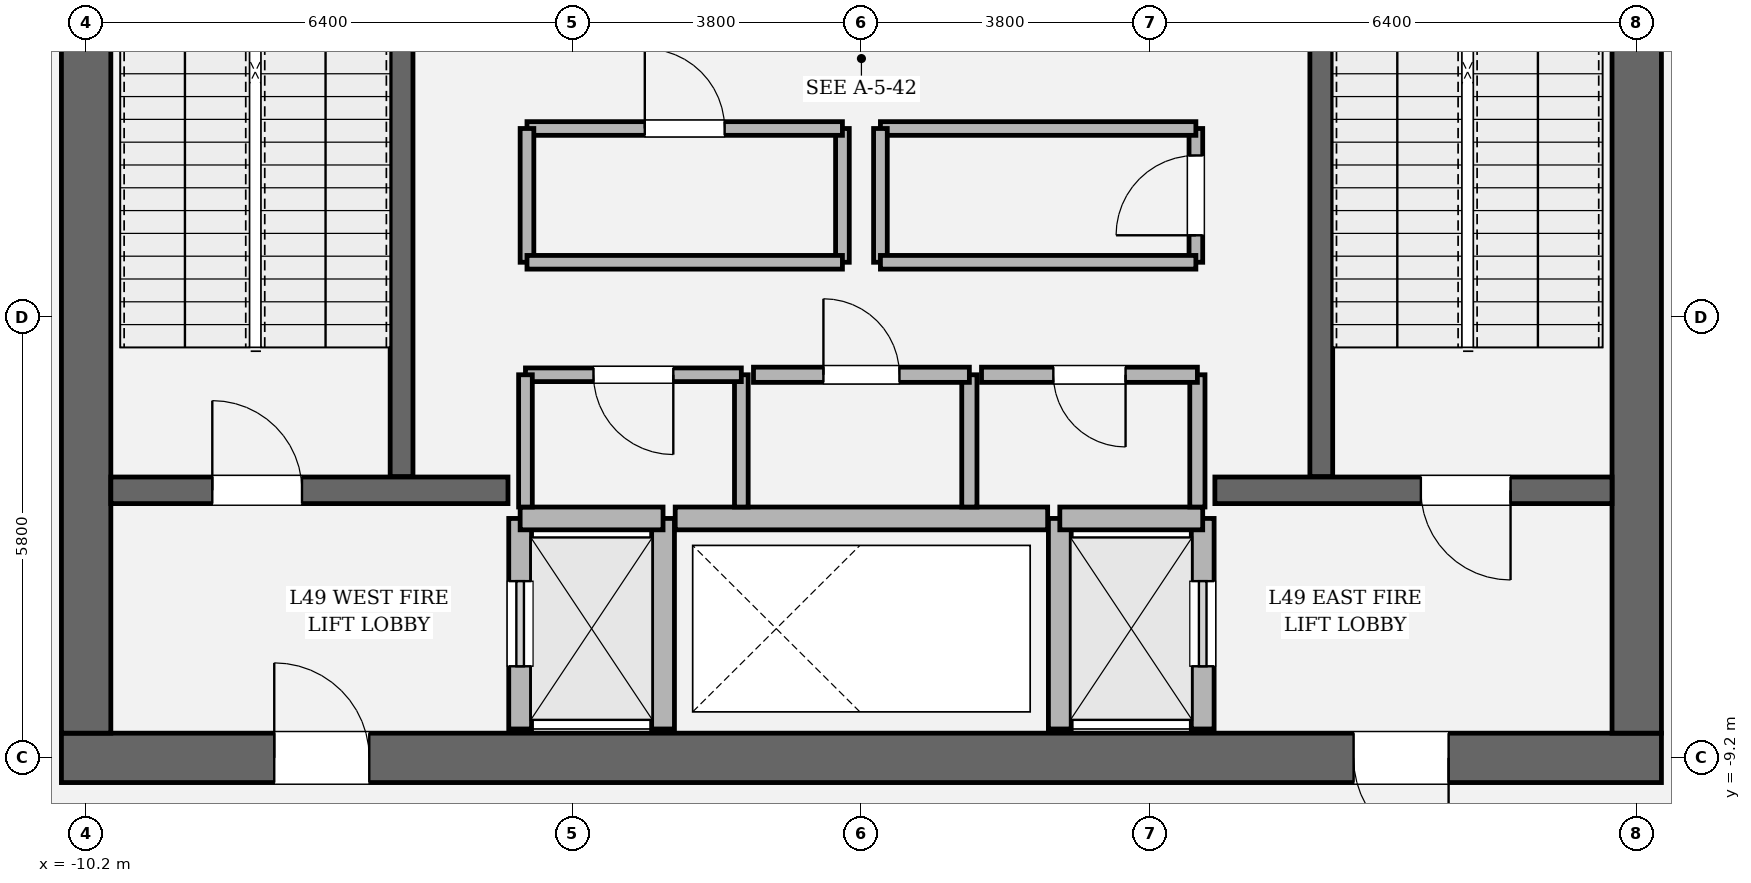
"""IFC4 building model, lengths in metres.
Left out: names, types, materials, properties, quantities, classifications, styles, units other than length and angle.
Written with IfcOpenShell. Run it as: python <this file> out.ifc"""

import sys

from ifc_helpers import new_model, si_unit, direction, frame, frame_2d, origin, place, context, subcontext, project, spatial, rectangle, extrude, element, fill, save


model = new_model("IFC4")
c1 = context("Model", 3, precision=1e-05, world=origin(), true_north=direction((0.0, 1.0)))
c2 = subcontext(c1, "Body", "Model", "MODEL_VIEW")
j1 = project(units=[si_unit("LENGTHUNIT", "METRE"), si_unit("PLANEANGLEUNIT", "RADIAN")], contexts=[c1])
p1 = place(None, origin())
s1 = spatial("IfcSite", under=j1, at=p1, CompositionType="ELEMENT")
p2 = place(p1, origin())
s2 = spatial("IfcBuilding", under=s1, at=p2, CompositionType="ELEMENT")
p3 = place(p2, frame((0.0, 0.0, 208.65)))
s3 = spatial("IfcBuildingStorey", under=s2, at=p3, CompositionType="ELEMENT", Elevation=208.65)
p4 = place(p3, frame((10.525, -9.2, 0.0), z_axis=(0.0, 0.0, 1.0), x_axis=(-1.0, 0.0, 0.0)))
e1 = element("IfcWall", 1, at=p4, inside=s3, PredefinedType="SHEAR", context=c2, shape_type="SweptSolid", body=[
    extrude(rectangle(XDim=21.05, YDim=0.65, at=frame_2d((10.525, 0.0))), origin(), (0.0, 0.0, 1.0), 4.05),
])
p5 = place(p4, frame((2.8, 0.0, 0.0)))
e2 = element("IfcOpeningElement", 2, at=p5, cuts=e1, PredefinedType="OPENING", context=c2, shape_type="SweptSolid", body=[
    extrude(rectangle(XDim=1.25, YDim=2.25, at=frame_2d((0.625, 1.125))), frame((0.0, 0.335, 0.0), z_axis=(0.0, -1.0, 0.0), x_axis=(1.0, 0.0, 0.0)), (0.0, 0.0, 1.0), 0.67),
])
p6 = place(p4, frame((17.0, 0.0, 0.0)))
e3 = element("IfcOpeningElement", 3, at=p6, cuts=e1, PredefinedType="OPENING", context=c2, shape_type="SweptSolid", body=[
    extrude(rectangle(XDim=1.25, YDim=2.25, at=frame_2d((0.625, 1.125))), frame((0.0, 0.335, 0.0), z_axis=(0.0, -1.0, 0.0), x_axis=(1.0, 0.0, 0.0)), (0.0, 0.0, 1.0), 0.67),
])
p7 = place(p3, frame((-10.2, -8.875, 0.0), z_axis=(0.0, 0.0, 1.0), x_axis=(0.0, 1.0, 0.0)))
e4 = element("IfcWall", 4, at=p7, inside=s3, PredefinedType="SHEAR", context=c2, shape_type="SweptSolid", body=[
    extrude(rectangle(XDim=17.75, YDim=0.65, at=frame_2d((8.875, 0.0))), origin(), (0.0, 0.0, 1.0), 4.05),
])
p8 = place(p7, frame((12.665, 0.0, 0.0)))
e5 = element("IfcOpeningElement", 5, at=p8, cuts=e4, PredefinedType="OPENING", context=c2, shape_type="SweptSolid", body=[
    extrude(rectangle(XDim=1.18, YDim=2.2, at=frame_2d((0.59, 1.1))), frame((0.0, 0.335, 0.0), z_axis=(0.0, -1.0, 0.0), x_axis=(1.0, 0.0, 0.0)), (0.0, 0.0, 1.0), 0.67),
])
p9 = place(p3, frame((10.2, 8.875, 0.0), z_axis=(0.0, 0.0, 1.0), x_axis=(0.0, -1.0, 0.0)))
e6 = element("IfcWall", 6, at=p9, inside=s3, PredefinedType="SHEAR", context=c2, shape_type="SweptSolid", body=[
    extrude(rectangle(XDim=17.75, YDim=0.65, at=frame_2d((8.875, 0.0))), origin(), (0.0, 0.0, 1.0), 4.05),
])
p10 = place(p9, frame((3.905, 0.0, 0.0)))
e7 = element("IfcOpeningElement", 7, at=p10, cuts=e6, PredefinedType="OPENING", context=c2, shape_type="SweptSolid", body=[
    extrude(rectangle(XDim=1.18, YDim=2.2, at=frame_2d((0.59, 1.1))), frame((0.0, 0.335, 0.0), z_axis=(0.0, -1.0, 0.0), x_axis=(1.0, 0.0, 0.0)), (0.0, 0.0, 1.0), 0.67),
])
for number, where, z_axis, x_axis in (
    (8, (-6.05, -5.5, 0.0), (0.0, 0.0, 1.0), (0.0, 1.0, 0.0)),
    (9, (6.05, 3.45, 0.0), (0.0, 0.0, 1.0), (0.0, -1.0, 0.0)),
):
    element("IfcWall", number, at=place(p3, frame(where, z_axis=z_axis, x_axis=x_axis)), inside=s3, PredefinedType="SOLIDWALL", context=c2, shape_type="SweptSolid", body=[
        extrude(rectangle(XDim=8.95, YDim=0.3, at=frame_2d((4.475, 0.0))), origin(), (0.0, 0.0, 1.0), 4.05),
    ])
p11 = place(p3, frame((-9.875, -5.68, 0.0), z_axis=(0.0, 0.0, 1.0), x_axis=(1.0, 0.0, 0.0)))
e10 = element("IfcWall", 10, at=p11, inside=s3, PredefinedType="SOLIDWALL", context=c2, shape_type="SweptSolid", body=[
    extrude(rectangle(XDim=5.225, YDim=0.35, at=frame_2d((2.613, 0.0))), origin(), (0.0, 0.0, 1.0), 4.05),
])
p12 = place(p11, frame((1.335, 0.0, 0.0)))
e11 = element("IfcOpeningElement", 11, at=p12, cuts=e10, PredefinedType="OPENING", context=c2, shape_type="SweptSolid", body=[
    extrude(rectangle(XDim=1.18, YDim=2.2, at=frame_2d((0.59, 1.1))), frame((0.0, 0.185, 0.0), z_axis=(0.0, -1.0, 0.0), x_axis=(1.0, 0.0, 0.0)), (0.0, 0.0, 1.0), 0.37),
])
p13 = place(p3, frame((4.65, -5.68, 0.0), z_axis=(0.0, 0.0, 1.0), x_axis=(1.0, 0.0, 0.0)))
e12 = element("IfcWall", 12, at=p13, inside=s3, PredefinedType="SOLIDWALL", context=c2, shape_type="SweptSolid", body=[
    extrude(rectangle(XDim=5.225, YDim=0.35, at=frame_2d((2.613, 0.0))), origin(), (0.0, 0.0, 1.0), 4.05),
])
p14 = place(p13, frame((2.71, 0.0, 0.0)))
e13 = element("IfcOpeningElement", 13, at=p14, cuts=e12, PredefinedType="OPENING", context=c2, shape_type="SweptSolid", body=[
    extrude(rectangle(XDim=1.18, YDim=2.2, at=frame_2d((0.59, 1.1))), frame((0.0, 0.185, 0.0), z_axis=(0.0, -1.0, 0.0), x_axis=(1.0, 0.0, 0.0)), (0.0, 0.0, 1.0), 0.37),
])
p15 = place(p3, frame((-4.49, -8.82, 0.0), z_axis=(0.0, 0.0, 1.0), x_axis=(0.0, 1.0, 0.0)))
e14 = element("IfcWall", 14, at=p15, inside=s3, PredefinedType="SOLIDWALL", context=c2, shape_type="SweptSolid", body=[
    extrude(rectangle(XDim=2.77, YDim=0.3, at=frame_2d((1.385, 0.0))), origin(), (0.0, 0.0, 1.0), 3.83),
])
p16 = place(p15, frame((0.825, 0.0, 0.0)))
e15 = element("IfcOpeningElement", 15, at=p16, cuts=e14, PredefinedType="OPENING", context=c2, shape_type="SweptSolid", body=[
    extrude(rectangle(XDim=1.12, YDim=2.25, at=frame_2d((0.56, 1.125))), frame((0.0, 0.16, 0.0), z_axis=(0.0, -1.0, 0.0), x_axis=(1.0, 0.0, 0.0)), (0.0, 0.0, 1.0), 0.32),
])
p17 = place(p3, frame((-2.61, -8.82, 0.0), z_axis=(0.0, 0.0, 1.0), x_axis=(0.0, 1.0, 0.0)))
e16 = element("IfcWall", 16, at=p17, inside=s3, PredefinedType="SOLIDWALL", context=c2, shape_type="SweptSolid", body=[
    extrude(rectangle(XDim=2.77, YDim=0.3, at=frame_2d((1.385, 0.0))), origin(), (0.0, 0.0, 1.0), 3.83),
])
p18 = place(p3, frame((-4.49, -6.05, 0.0), z_axis=(0.0, 0.0, 1.0), x_axis=(1.0, 0.0, 0.0)))
e17 = element("IfcWall", 17, at=p18, inside=s3, PredefinedType="SOLIDWALL", context=c2, shape_type="SweptSolid", body=[
    extrude(rectangle(XDim=1.88, YDim=0.3, at=frame_2d((0.94, 0.0))), origin(), (0.0, 0.0, 1.0), 3.83),
])
p19 = place(p3, frame((4.49, -8.82, 0.0), z_axis=(0.0, 0.0, 1.0), x_axis=(0.0, 1.0, 0.0)))
e18 = element("IfcWall", 18, at=p19, inside=s3, PredefinedType="SOLIDWALL", context=c2, shape_type="SweptSolid", body=[
    extrude(rectangle(XDim=2.77, YDim=0.3, at=frame_2d((1.385, 0.0))), origin(), (0.0, 0.0, 1.0), 3.83),
])
p20 = place(p19, frame((0.825, 0.0, 0.0)))
e19 = element("IfcOpeningElement", 19, at=p20, cuts=e18, PredefinedType="OPENING", context=c2, shape_type="SweptSolid", body=[
    extrude(rectangle(XDim=1.12, YDim=2.25, at=frame_2d((0.56, 1.125))), frame((0.0, 0.16, 0.0), z_axis=(0.0, -1.0, 0.0), x_axis=(1.0, 0.0, 0.0)), (0.0, 0.0, 1.0), 0.32),
])
p21 = place(p3, frame((2.61, -8.82, 0.0), z_axis=(0.0, 0.0, 1.0), x_axis=(0.0, 1.0, 0.0)))
e20 = element("IfcWall", 20, at=p21, inside=s3, PredefinedType="SOLIDWALL", context=c2, shape_type="SweptSolid", body=[
    extrude(rectangle(XDim=2.77, YDim=0.3, at=frame_2d((1.385, 0.0))), origin(), (0.0, 0.0, 1.0), 3.83),
])
p22 = place(p3, frame((2.61, -6.05, 0.0), z_axis=(0.0, 0.0, 1.0), x_axis=(1.0, 0.0, 0.0)))
e21 = element("IfcWall", 21, at=p22, inside=s3, PredefinedType="SOLIDWALL", context=c2, shape_type="SweptSolid", body=[
    extrude(rectangle(XDim=1.88, YDim=0.3, at=frame_2d((0.94, 0.0))), origin(), (0.0, 0.0, 1.0), 3.83),
])
p23 = place(p3, frame((-2.45, -6.05, 0.0), z_axis=(0.0, 0.0, 1.0), x_axis=(1.0, 0.0, 0.0)))
e22 = element("IfcWall", 22, at=p23, inside=s3, PredefinedType="SOLIDWALL", context=c2, shape_type="SweptSolid", body=[
    extrude(rectangle(XDim=4.9, YDim=0.3, at=frame_2d((2.45, 0.0))), origin(), (0.0, 0.0, 1.0), 3.83),
])
p24 = place(p3, frame((-1.58, -5.9, 0.0), z_axis=(0.0, 0.0, 1.0), x_axis=(0.0, 1.0, 0.0)))
e23 = element("IfcWall", 23, at=p24, inside=s3, PredefinedType="PARTITIONING", context=c2, shape_type="SweptSolid", body=[
    extrude(rectangle(XDim=1.74, YDim=0.18, at=frame_2d((0.87, 0.0))), origin(), (0.0, 0.0, 1.0), 3.83),
])
p25 = place(p3, frame((-1.58, -4.16, 0.0), z_axis=(0.0, 0.0, 1.0), x_axis=(-1.0, 0.0, 0.0)))
e24 = element("IfcWall", 24, at=p25, inside=s3, PredefinedType="PARTITIONING", context=c2, shape_type="SweptSolid", body=[
    extrude(rectangle(XDim=2.84, YDim=0.18, at=frame_2d((1.42, 0.0))), origin(), (0.0, 0.0, 1.0), 3.83),
])
p26 = place(p25, frame((0.895, 0.0, 0.0)))
e25 = element("IfcOpeningElement", 25, at=p26, cuts=e24, PredefinedType="OPENING", context=c2, shape_type="SweptSolid", body=[
    extrude(rectangle(XDim=1.05, YDim=2.2, at=frame_2d((0.525, 1.1))), frame((0.0, 0.1, 0.0), z_axis=(0.0, -1.0, 0.0), x_axis=(1.0, 0.0, 0.0)), (0.0, 0.0, 1.0), 0.2),
])
p27 = place(p3, frame((-4.42, -4.16, 0.0), z_axis=(0.0, 0.0, 1.0), x_axis=(0.0, -1.0, 0.0)))
e26 = element("IfcWall", 26, at=p27, inside=s3, PredefinedType="PARTITIONING", context=c2, shape_type="SweptSolid", body=[
    extrude(rectangle(XDim=1.74, YDim=0.18, at=frame_2d((0.87, 0.0))), origin(), (0.0, 0.0, 1.0), 3.83),
])
p28 = place(p3, frame((1.42, -5.9, 0.0), z_axis=(0.0, 0.0, 1.0), x_axis=(0.0, 1.0, 0.0)))
e27 = element("IfcWall", 27, at=p28, inside=s3, PredefinedType="SOLIDWALL", context=c2, shape_type="SweptSolid", body=[
    extrude(rectangle(XDim=1.74, YDim=0.2, at=frame_2d((0.87, 0.0))), origin(), (0.0, 0.0, 1.0), 3.83),
])
p29 = place(p3, frame((1.42, -4.16, 0.0), z_axis=(0.0, 0.0, 1.0), x_axis=(-1.0, 0.0, 0.0)))
e28 = element("IfcWall", 28, at=p29, inside=s3, PredefinedType="SOLIDWALL", context=c2, shape_type="SweptSolid", body=[
    extrude(rectangle(XDim=2.84, YDim=0.2, at=frame_2d((1.42, 0.0))), origin(), (0.0, 0.0, 1.0), 3.83),
])
p30 = place(p29, frame((0.92, 0.0, 0.0)))
e29 = element("IfcOpeningElement", 29, at=p30, cuts=e28, PredefinedType="OPENING", context=c2, shape_type="SweptSolid", body=[
    extrude(rectangle(XDim=1.0, YDim=2.15, at=frame_2d((0.5, 1.075))), frame((0.0, 0.11, 0.0), z_axis=(0.0, -1.0, 0.0), x_axis=(1.0, 0.0, 0.0)), (0.0, 0.0, 1.0), 0.22),
])
p31 = place(p3, frame((4.42, -5.9, 0.0), z_axis=(0.0, 0.0, 1.0), x_axis=(0.0, 1.0, 0.0)))
e30 = element("IfcWall", 30, at=p31, inside=s3, PredefinedType="SOLIDWALL", context=c2, shape_type="SweptSolid", body=[
    extrude(rectangle(XDim=1.74, YDim=0.2, at=frame_2d((0.87, 0.0))), origin(), (0.0, 0.0, 1.0), 3.83),
])
p32 = place(p3, frame((4.42, -4.16, 0.0), z_axis=(0.0, 0.0, 1.0), x_axis=(-1.0, 0.0, 0.0)))
e31 = element("IfcWall", 31, at=p32, inside=s3, PredefinedType="SOLIDWALL", context=c2, shape_type="SweptSolid", body=[
    extrude(rectangle(XDim=2.84, YDim=0.2, at=frame_2d((1.42, 0.0))), origin(), (0.0, 0.0, 1.0), 3.83),
])
p33 = place(p32, frame((0.945, 0.0, 0.0)))
e32 = element("IfcOpeningElement", 32, at=p33, cuts=e31, PredefinedType="OPENING", context=c2, shape_type="SweptSolid", body=[
    extrude(rectangle(XDim=0.95, YDim=2.15, at=frame_2d((0.475, 1.075))), frame((0.0, 0.11, 0.0), z_axis=(0.0, -1.0, 0.0), x_axis=(1.0, 0.0, 0.0)), (0.0, 0.0, 1.0), 0.22),
])
p34 = place(p3, frame((-0.25, -2.68, 0.0), z_axis=(0.0, 0.0, 1.0), x_axis=(0.0, 1.0, 0.0)))
e33 = element("IfcWall", 33, at=p34, inside=s3, PredefinedType="PARTITIONING", context=c2, shape_type="SweptSolid", body=[
    extrude(rectangle(XDim=1.76, YDim=0.18, at=frame_2d((0.88, 0.0))), origin(), (0.0, 0.0, 1.0), 3.83),
])
p35 = place(p3, frame((-0.25, -0.92, 0.0), z_axis=(0.0, 0.0, 1.0), x_axis=(-1.0, 0.0, 0.0)))
e34 = element("IfcWall", 34, at=p35, inside=s3, PredefinedType="PARTITIONING", context=c2, shape_type="SweptSolid", body=[
    extrude(rectangle(XDim=4.15, YDim=0.18, at=frame_2d((2.075, 0.0))), origin(), (0.0, 0.0, 1.0), 3.83),
])
p36 = place(p35, frame((1.55, 0.0, 0.0)))
e35 = element("IfcOpeningElement", 35, at=p36, cuts=e34, PredefinedType="OPENING", context=c2, shape_type="SweptSolid", body=[
    extrude(rectangle(XDim=1.05, YDim=2.2, at=frame_2d((0.525, 1.1))), frame((0.0, 0.1, 0.0), z_axis=(0.0, -1.0, 0.0), x_axis=(1.0, 0.0, 0.0)), (0.0, 0.0, 1.0), 0.2),
])
p37 = place(p3, frame((-4.4, -0.92, 0.0), z_axis=(0.0, 0.0, 1.0), x_axis=(0.0, -1.0, 0.0)))
e36 = element("IfcWall", 36, at=p37, inside=s3, PredefinedType="PARTITIONING", context=c2, shape_type="SweptSolid", body=[
    extrude(rectangle(XDim=1.76, YDim=0.18, at=frame_2d((0.88, 0.0))), origin(), (0.0, 0.0, 1.0), 3.83),
])
p38 = place(p3, frame((-4.4, -2.68, 0.0), z_axis=(0.0, 0.0, 1.0), x_axis=(1.0, 0.0, 0.0)))
e37 = element("IfcWall", 37, at=p38, inside=s3, PredefinedType="PARTITIONING", context=c2, shape_type="SweptSolid", body=[
    extrude(rectangle(XDim=4.15, YDim=0.18, at=frame_2d((2.075, 0.0))), origin(), (0.0, 0.0, 1.0), 3.83),
])
p39 = place(p3, frame((4.4, -2.68, 0.0), z_axis=(0.0, 0.0, 1.0), x_axis=(0.0, 1.0, 0.0)))
e38 = element("IfcWall", 38, at=p39, inside=s3, PredefinedType="PARTITIONING", context=c2, shape_type="SweptSolid", body=[
    extrude(rectangle(XDim=1.76, YDim=0.18, at=frame_2d((0.88, 0.0))), origin(), (0.0, 0.0, 1.0), 3.83),
])
p40 = place(p39, frame((0.355, 0.0, 0.0)))
e39 = element("IfcOpeningElement", 39, at=p40, cuts=e38, PredefinedType="OPENING", context=c2, shape_type="SweptSolid", body=[
    extrude(rectangle(XDim=1.05, YDim=2.2, at=frame_2d((0.525, 1.1))), frame((0.0, 0.1, 0.0), z_axis=(0.0, -1.0, 0.0), x_axis=(1.0, 0.0, 0.0)), (0.0, 0.0, 1.0), 0.2),
])
p41 = place(p3, frame((4.4, -0.92, 0.0), z_axis=(0.0, 0.0, 1.0), x_axis=(-1.0, 0.0, 0.0)))
e40 = element("IfcWall", 40, at=p41, inside=s3, PredefinedType="PARTITIONING", context=c2, shape_type="SweptSolid", body=[
    extrude(rectangle(XDim=4.15, YDim=0.18, at=frame_2d((2.075, 0.0))), origin(), (0.0, 0.0, 1.0), 3.83),
])
p42 = place(p3, frame((0.25, -0.92, 0.0), z_axis=(0.0, 0.0, 1.0), x_axis=(0.0, -1.0, 0.0)))
e41 = element("IfcWall", 41, at=p42, inside=s3, PredefinedType="PARTITIONING", context=c2, shape_type="SweptSolid", body=[
    extrude(rectangle(XDim=1.76, YDim=0.18, at=frame_2d((0.88, 0.0))), origin(), (0.0, 0.0, 1.0), 3.83),
])
p43 = place(p3, frame((0.25, -2.68, 0.0), z_axis=(0.0, 0.0, 1.0), x_axis=(1.0, 0.0, 0.0)))
e42 = element("IfcWall", 42, at=p43, inside=s3, PredefinedType="PARTITIONING", context=c2, shape_type="SweptSolid", body=[
    extrude(rectangle(XDim=4.15, YDim=0.18, at=frame_2d((2.075, 0.0))), origin(), (0.0, 0.0, 1.0), 3.83),
])
p44 = place(p12, origin())
e43 = element("IfcDoor", 43, at=p44, inside=s3, OperationType="SINGLE_SWING_LEFT", PredefinedType="DOOR", context=c2, shape_type="SweptSolid", body=[
    extrude(rectangle(XDim=1.18, YDim=2.2, at=frame_2d((0.59, 1.1))), frame((0.0, 0.025, 0.0), z_axis=(0.0, -1.0, 0.0), x_axis=(1.0, 0.0, 0.0)), (0.0, 0.0, 1.0), 0.05),
])
fill(e11, e43)
p45 = place(p14, origin())
e44 = element("IfcDoor", 44, at=p45, inside=s3, OperationType="SINGLE_SWING_RIGHT", PredefinedType="DOOR", context=c2, shape_type="SweptSolid", body=[
    extrude(rectangle(XDim=1.18, YDim=2.2, at=frame_2d((0.59, 1.1))), frame((0.0, 0.025, 0.0), z_axis=(0.0, -1.0, 0.0), x_axis=(1.0, 0.0, 0.0)), (0.0, 0.0, 1.0), 0.05),
])
fill(e13, e44)
p46 = place(p5, origin())
e45 = element("IfcDoor", 45, at=p46, inside=s3, OperationType="SINGLE_SWING_LEFT", PredefinedType="DOOR", context=c2, shape_type="SweptSolid", body=[
    extrude(rectangle(XDim=1.25, YDim=2.25, at=frame_2d((0.625, 1.125))), frame((0.0, 0.025, 0.0), z_axis=(0.0, -1.0, 0.0), x_axis=(1.0, 0.0, 0.0)), (0.0, 0.0, 1.0), 0.05),
])
fill(e2, e45)
p47 = place(p6, origin())
e46 = element("IfcDoor", 46, at=p47, inside=s3, OperationType="SINGLE_SWING_RIGHT", PredefinedType="DOOR", context=c2, shape_type="SweptSolid", body=[
    extrude(rectangle(XDim=1.25, YDim=2.25, at=frame_2d((0.625, 1.125))), frame((0.0, 0.025, 0.0), z_axis=(0.0, -1.0, 0.0), x_axis=(1.0, 0.0, 0.0)), (0.0, 0.0, 1.0), 0.05),
])
fill(e3, e46)
p48 = place(p16, origin())
e47 = element("IfcDoor", 47, at=p48, inside=s3, OperationType="SLIDING_TO_LEFT", PredefinedType="DOOR", context=c2, shape_type="SweptSolid", body=[
    extrude(rectangle(XDim=1.12, YDim=2.25, at=frame_2d((0.56, 1.125))), frame((0.0, 0.025, 0.0), z_axis=(0.0, -1.0, 0.0), x_axis=(1.0, 0.0, 0.0)), (0.0, 0.0, 1.0), 0.05),
])
fill(e15, e47)
p49 = place(p20, origin())
e48 = element("IfcDoor", 48, at=p49, inside=s3, OperationType="SLIDING_TO_RIGHT", PredefinedType="DOOR", context=c2, shape_type="SweptSolid", body=[
    extrude(rectangle(XDim=1.12, YDim=2.25, at=frame_2d((0.56, 1.125))), frame((0.0, 0.025, 0.0), z_axis=(0.0, -1.0, 0.0), x_axis=(1.0, 0.0, 0.0)), (0.0, 0.0, 1.0), 0.05),
])
fill(e19, e48)
p50 = place(p26, origin())
e49 = element("IfcDoor", 49, at=p50, inside=s3, OperationType="SINGLE_SWING_LEFT", PredefinedType="DOOR", context=c2, shape_type="SweptSolid", body=[
    extrude(rectangle(XDim=1.05, YDim=2.2, at=frame_2d((0.525, 1.1))), frame((0.0, 0.025, 0.0), z_axis=(0.0, -1.0, 0.0), x_axis=(1.0, 0.0, 0.0)), (0.0, 0.0, 1.0), 0.05),
])
fill(e25, e49)
p51 = place(p30, origin())
e50 = element("IfcDoor", 50, at=p51, inside=s3, OperationType="SINGLE_SWING_RIGHT", PredefinedType="DOOR", context=c2, shape_type="SweptSolid", body=[
    extrude(rectangle(XDim=1.0, YDim=2.15, at=frame_2d((0.5, 1.075))), frame((0.0, 0.025, 0.0), z_axis=(0.0, -1.0, 0.0), x_axis=(1.0, 0.0, 0.0)), (0.0, 0.0, 1.0), 0.05),
])
fill(e29, e50)
p52 = place(p33, origin())
e51 = element("IfcDoor", 51, at=p52, inside=s3, OperationType="SINGLE_SWING_LEFT", PredefinedType="DOOR", context=c2, shape_type="SweptSolid", body=[
    extrude(rectangle(XDim=0.95, YDim=2.15, at=frame_2d((0.475, 1.075))), frame((0.0, 0.025, 0.0), z_axis=(0.0, -1.0, 0.0), x_axis=(1.0, 0.0, 0.0)), (0.0, 0.0, 1.0), 0.05),
])
fill(e32, e51)
p53 = place(p36, origin())
e52 = element("IfcDoor", 52, at=p53, inside=s3, OperationType="SINGLE_SWING_RIGHT", PredefinedType="DOOR", context=c2, shape_type="SweptSolid", body=[
    extrude(rectangle(XDim=1.05, YDim=2.2, at=frame_2d((0.525, 1.1))), frame((0.0, 0.025, 0.0), z_axis=(0.0, -1.0, 0.0), x_axis=(1.0, 0.0, 0.0)), (0.0, 0.0, 1.0), 0.05),
])
fill(e35, e52)
p54 = place(p40, origin())
e53 = element("IfcDoor", 53, at=p54, inside=s3, OperationType="SINGLE_SWING_LEFT", PredefinedType="DOOR", context=c2, shape_type="SweptSolid", body=[
    extrude(rectangle(XDim=1.05, YDim=2.2, at=frame_2d((0.525, 1.1))), frame((0.0, 0.025, 0.0), z_axis=(0.0, -1.0, 0.0), x_axis=(1.0, 0.0, 0.0)), (0.0, 0.0, 1.0), 0.05),
])
fill(e39, e53)
save(model, sys.argv[1])
